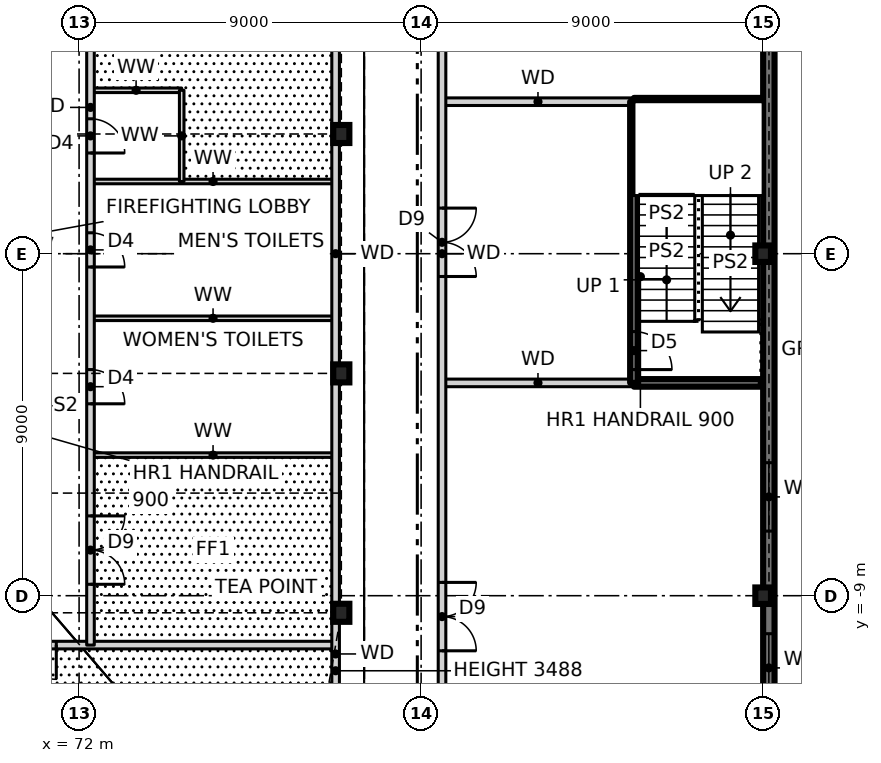
"""IFC4 building model, lengths in metres.
Left out: names, types, materials, properties, quantities, classifications, styles, units other than length and angle.
Written with IfcOpenShell. Run it as: python <this file> out.ifc"""

import sys

from ifc_helpers import new_model, si_unit, direction, frame, frame_2d, origin, origin_2d, place, context, subcontext, project, spatial, rectangle, i_section, extrude, element, fill, save


model = new_model("IFC4")
c1 = context("Model", 3, precision=1e-05, world=origin(), true_north=direction((0.0, 1.0)))
c2 = subcontext(c1, "Body", "Model", "MODEL_VIEW")
j1 = project(units=[si_unit("LENGTHUNIT", "METRE"), si_unit("PLANEANGLEUNIT", "RADIAN")], contexts=[c1])
p1 = place(None, origin())
s1 = spatial("IfcSite", under=j1, at=p1, CompositionType="ELEMENT")
p2 = place(p1, origin())
s2 = spatial("IfcBuilding", under=s1, at=p2, CompositionType="ELEMENT")
p3 = place(p2, frame((0.0, 0.0, 6.0)))
s3 = spatial("IfcBuildingStorey", under=s2, at=p3, CompositionType="ELEMENT", Elevation=6.0)
for number, where, z_axis, x_axis in (
    (1, (78.9, -9.45, 0.0), (0.0, 0.0, 1.0), (1.0, 0.0, 0.0)),
    (2, (78.9, -3.15, 0.0), (0.0, 0.0, 1.0), (1.0, 0.0, 0.0)),
    (3, (78.9, 3.15, 0.0), (0.0, 0.0, 1.0), (1.0, 0.0, 0.0)),
):
    element("IfcColumn", number, at=place(p3, frame(where, z_axis=z_axis, x_axis=x_axis)), inside=s3, PredefinedType="COLUMN", context=c2, shape_type="SweptSolid", body=[
        extrude(i_section(OverallWidth=0.424, OverallDepth=0.475, WebThickness=0.048, FlangeThickness=0.077, at=origin_2d()), origin(), (0.0, 0.0, 1.0), 4.5),
    ])
for number, where, z_axis, x_axis in (
    (4, (90.0, -9.0, 0.0), (0.0, 0.0, 1.0), (1.0, 0.0, 0.0)),
    (5, (90.0, 0.0, 0.0), (0.0, 0.0, 1.0), (1.0, 0.0, 0.0)),
):
    element("IfcColumn", number, at=place(p3, frame(where, z_axis=z_axis, x_axis=x_axis)), inside=s3, PredefinedType="COLUMN", context=c2, shape_type="SweptSolid", body=[
        extrude(i_section(OverallWidth=0.411, OverallDepth=0.434, WebThickness=0.036, FlangeThickness=0.057, at=origin_2d()), origin(), (0.0, 0.0, 1.0), 4.5),
    ])
p4 = place(p3, frame((90.15, -36.3, -0.25), z_axis=(0.0, 0.0, 1.0), x_axis=(0.0, 1.0, 0.0)))
e6 = element("IfcWall", 6, at=p4, inside=s3, PredefinedType="SOLIDWALL", context=c2, shape_type="SweptSolid", body=[
    extrude(rectangle(XDim=72.6, YDim=0.3, at=frame_2d((36.3, 0.0))), origin(), (0.0, 0.0, 1.0), 3.73),
])
p5 = place(p4, frame((2.0, 0.0, 1.15)))
e7 = element("IfcOpeningElement", 7, at=p5, cuts=e6, PredefinedType="OPENING", context=c2, shape_type="SweptSolid", body=[
    extrude(rectangle(XDim=1.8, YDim=2.4, at=frame_2d((0.9, 1.2))), frame((0.0, 0.16, 0.0), z_axis=(0.0, -1.0, 0.0), x_axis=(1.0, 0.0, 0.0)), (0.0, 0.0, 1.0), 0.32),
])
p6 = place(p4, frame((6.5, 0.0, 1.15)))
e8 = element("IfcOpeningElement", 8, at=p6, cuts=e6, PredefinedType="OPENING", context=c2, shape_type="SweptSolid", body=[
    extrude(rectangle(XDim=1.8, YDim=2.4, at=frame_2d((0.9, 1.2))), frame((0.0, 0.16, 0.0), z_axis=(0.0, -1.0, 0.0), x_axis=(1.0, 0.0, 0.0)), (0.0, 0.0, 1.0), 0.32),
])
p7 = place(p4, frame((11.0, 0.0, 1.15)))
e9 = element("IfcOpeningElement", 9, at=p7, cuts=e6, PredefinedType="OPENING", context=c2, shape_type="SweptSolid", body=[
    extrude(rectangle(XDim=1.8, YDim=2.4, at=frame_2d((0.9, 1.2))), frame((0.0, 0.16, 0.0), z_axis=(0.0, -1.0, 0.0), x_axis=(1.0, 0.0, 0.0)), (0.0, 0.0, 1.0), 0.32),
])
p8 = place(p4, frame((15.5, 0.0, 1.15)))
e10 = element("IfcOpeningElement", 10, at=p8, cuts=e6, PredefinedType="OPENING", context=c2, shape_type="SweptSolid", body=[
    extrude(rectangle(XDim=1.8, YDim=2.4, at=frame_2d((0.9, 1.2))), frame((0.0, 0.16, 0.0), z_axis=(0.0, -1.0, 0.0), x_axis=(1.0, 0.0, 0.0)), (0.0, 0.0, 1.0), 0.32),
])
p9 = place(p4, frame((20.0, 0.0, 1.15)))
e11 = element("IfcOpeningElement", 11, at=p9, cuts=e6, PredefinedType="OPENING", context=c2, shape_type="SweptSolid", body=[
    extrude(rectangle(XDim=1.8, YDim=2.4, at=frame_2d((0.9, 1.2))), frame((0.0, 0.16, 0.0), z_axis=(0.0, -1.0, 0.0), x_axis=(1.0, 0.0, 0.0)), (0.0, 0.0, 1.0), 0.32),
])
p10 = place(p4, frame((24.5, 0.0, 1.15)))
e12 = element("IfcOpeningElement", 12, at=p10, cuts=e6, PredefinedType="OPENING", context=c2, shape_type="SweptSolid", body=[
    extrude(rectangle(XDim=1.8, YDim=2.4, at=frame_2d((0.9, 1.2))), frame((0.0, 0.16, 0.0), z_axis=(0.0, -1.0, 0.0), x_axis=(1.0, 0.0, 0.0)), (0.0, 0.0, 1.0), 0.32),
])
p11 = place(p4, frame((29.0, 0.0, 1.15)))
e13 = element("IfcOpeningElement", 13, at=p11, cuts=e6, PredefinedType="OPENING", context=c2, shape_type="SweptSolid", body=[
    extrude(rectangle(XDim=1.8, YDim=2.4, at=frame_2d((0.9, 1.2))), frame((0.0, 0.16, 0.0), z_axis=(0.0, -1.0, 0.0), x_axis=(1.0, 0.0, 0.0)), (0.0, 0.0, 1.0), 0.32),
])
p12 = place(p4, frame((42.5, 0.0, 1.15)))
e14 = element("IfcOpeningElement", 14, at=p12, cuts=e6, PredefinedType="OPENING", context=c2, shape_type="SweptSolid", body=[
    extrude(rectangle(XDim=1.8, YDim=2.4, at=frame_2d((0.9, 1.2))), frame((0.0, 0.16, 0.0), z_axis=(0.0, -1.0, 0.0), x_axis=(1.0, 0.0, 0.0)), (0.0, 0.0, 1.0), 0.32),
])
p13 = place(p4, frame((47.0, 0.0, 1.15)))
e15 = element("IfcOpeningElement", 15, at=p13, cuts=e6, PredefinedType="OPENING", context=c2, shape_type="SweptSolid", body=[
    extrude(rectangle(XDim=1.8, YDim=2.4, at=frame_2d((0.9, 1.2))), frame((0.0, 0.16, 0.0), z_axis=(0.0, -1.0, 0.0), x_axis=(1.0, 0.0, 0.0)), (0.0, 0.0, 1.0), 0.32),
])
p14 = place(p4, frame((51.5, 0.0, 1.15)))
e16 = element("IfcOpeningElement", 16, at=p14, cuts=e6, PredefinedType="OPENING", context=c2, shape_type="SweptSolid", body=[
    extrude(rectangle(XDim=1.8, YDim=2.4, at=frame_2d((0.9, 1.2))), frame((0.0, 0.16, 0.0), z_axis=(0.0, -1.0, 0.0), x_axis=(1.0, 0.0, 0.0)), (0.0, 0.0, 1.0), 0.32),
])
p15 = place(p4, frame((56.0, 0.0, 1.15)))
e17 = element("IfcOpeningElement", 17, at=p15, cuts=e6, PredefinedType="OPENING", context=c2, shape_type="SweptSolid", body=[
    extrude(rectangle(XDim=1.8, YDim=2.4, at=frame_2d((0.9, 1.2))), frame((0.0, 0.16, 0.0), z_axis=(0.0, -1.0, 0.0), x_axis=(1.0, 0.0, 0.0)), (0.0, 0.0, 1.0), 0.32),
])
p16 = place(p4, frame((60.5, 0.0, 1.15)))
e18 = element("IfcOpeningElement", 18, at=p16, cuts=e6, PredefinedType="OPENING", context=c2, shape_type="SweptSolid", body=[
    extrude(rectangle(XDim=1.8, YDim=2.4, at=frame_2d((0.9, 1.2))), frame((0.0, 0.16, 0.0), z_axis=(0.0, -1.0, 0.0), x_axis=(1.0, 0.0, 0.0)), (0.0, 0.0, 1.0), 0.32),
])
p17 = place(p4, frame((65.0, 0.0, 1.15)))
e19 = element("IfcOpeningElement", 19, at=p17, cuts=e6, PredefinedType="OPENING", context=c2, shape_type="SweptSolid", body=[
    extrude(rectangle(XDim=1.8, YDim=2.4, at=frame_2d((0.9, 1.2))), frame((0.0, 0.16, 0.0), z_axis=(0.0, -1.0, 0.0), x_axis=(1.0, 0.0, 0.0)), (0.0, 0.0, 1.0), 0.32),
])
p18 = place(p4, frame((69.5, 0.0, 1.15)))
e20 = element("IfcOpeningElement", 20, at=p18, cuts=e6, PredefinedType="OPENING", context=c2, shape_type="SweptSolid", body=[
    extrude(rectangle(XDim=1.8, YDim=2.4, at=frame_2d((0.9, 1.2))), frame((0.0, 0.16, 0.0), z_axis=(0.0, -1.0, 0.0), x_axis=(1.0, 0.0, 0.0)), (0.0, 0.0, 1.0), 0.32),
])
p19 = place(p3, frame((53.7, -10.3, 0.0), z_axis=(0.0, 0.0, 1.0), x_axis=(1.0, 0.0, 0.0)))
e21 = element("IfcWall", 21, at=p19, inside=s3, PredefinedType="SOLIDWALL", context=c2, shape_type="SweptSolid", body=[
    extrude(rectangle(XDim=25.05, YDim=0.2, at=frame_2d((12.525, 0.0))), origin(), (0.0, 0.0, 1.0), 4.25),
])
p20 = place(p19, frame((6.6, 0.0, 0.0)))
e22 = element("IfcOpeningElement", 22, at=p20, cuts=e21, PredefinedType="OPENING", context=c2, shape_type="SweptSolid", body=[
    extrude(rectangle(XDim=1.8, YDim=2.1, at=frame_2d((0.9, 1.05))), frame((0.0, 0.11, 0.0), z_axis=(0.0, -1.0, 0.0), x_axis=(1.0, 0.0, 0.0)), (0.0, 0.0, 1.0), 0.22),
])
p21 = place(p19, frame((15.9, 0.0, 0.0)))
e23 = element("IfcOpeningElement", 23, at=p21, cuts=e21, PredefinedType="OPENING", context=c2, shape_type="SweptSolid", body=[
    extrude(rectangle(XDim=1.8, YDim=2.1, at=frame_2d((0.9, 1.05))), frame((0.0, 0.11, 0.0), z_axis=(0.0, -1.0, 0.0), x_axis=(1.0, 0.0, 0.0)), (0.0, 0.0, 1.0), 0.22),
])
p22 = place(p3, frame((72.3, -5.3, 0.0), z_axis=(0.0, 0.0, 1.0), x_axis=(1.0, 0.0, 0.0)))
e24 = element("IfcWall", 24, at=p22, inside=s3, PredefinedType="PARTITIONING", context=c2, shape_type="SweptSolid", body=[
    extrude(rectangle(XDim=6.45, YDim=0.12, at=frame_2d((3.225, 0.0))), origin(), (0.0, 0.0, 1.0), 4.25),
])
p23 = place(p3, frame((81.55, -3.4, 0.0), z_axis=(0.0, 0.0, 1.0), x_axis=(1.0, 0.0, 0.0)))
e25 = element("IfcWall", 25, at=p23, inside=s3, PredefinedType="SOLIDWALL", context=c2, shape_type="SweptSolid", body=[
    extrude(rectangle(XDim=5.05, YDim=0.2, at=frame_2d((2.525, 0.0))), origin(), (0.0, 0.0, 1.0), 4.25),
])
p24 = place(p3, frame((86.6, -3.4, 0.0), z_axis=(0.0, 0.0, 1.0), x_axis=(1.0, 0.0, 0.0)))
e26 = element("IfcWall", 26, at=p24, inside=s3, PredefinedType="SOLIDWALL", context=c2, shape_type="SweptSolid", body=[
    extrude(rectangle(XDim=3.34, YDim=0.2, at=frame_2d((1.67, 0.0))), origin(), (0.0, 0.0, 1.0), 4.5),
])
for number, where, z_axis, x_axis in (
    (27, (72.3, -1.7, 0.0), (0.0, 0.0, 1.0), (1.0, 0.0, 0.0)),
    (28, (72.3, 1.9, 0.0), (0.0, 0.0, 1.0), (1.0, 0.0, 0.0)),
):
    element("IfcWall", number, at=place(p3, frame(where, z_axis=z_axis, x_axis=x_axis)), inside=s3, PredefinedType="PARTITIONING", context=c2, shape_type="SweptSolid", body=[
        extrude(rectangle(XDim=6.45, YDim=0.12, at=frame_2d((3.225, 0.0))), origin(), (0.0, 0.0, 1.0), 4.25),
    ])
p25 = place(p3, frame((81.55, 4.0, 0.0), z_axis=(0.0, 0.0, 1.0), x_axis=(1.0, 0.0, 0.0)))
e29 = element("IfcWall", 29, at=p25, inside=s3, PredefinedType="SOLIDWALL", context=c2, shape_type="SweptSolid", body=[
    extrude(rectangle(XDim=5.05, YDim=0.2, at=frame_2d((2.525, 0.0))), origin(), (0.0, 0.0, 1.0), 4.25),
])
p26 = place(p3, frame((86.6, 4.0, 0.0), z_axis=(0.0, 0.0, 1.0), x_axis=(1.0, 0.0, 0.0)))
e30 = element("IfcWall", 30, at=p26, inside=s3, PredefinedType="SOLIDWALL", context=c2, shape_type="SweptSolid", body=[
    extrude(rectangle(XDim=3.34, YDim=0.2, at=frame_2d((1.67, 0.0))), origin(), (0.0, 0.0, 1.0), 4.5),
])
p27 = place(p3, frame((72.3, 4.3, 0.0), z_axis=(0.0, 0.0, 1.0), x_axis=(1.0, 0.0, 0.0)))
e31 = element("IfcWall", 31, at=p27, inside=s3, PredefinedType="PARTITIONING", context=c2, shape_type="SweptSolid", body=[
    extrude(rectangle(XDim=2.4, YDim=0.12, at=frame_2d((1.2, 0.0))), origin(), (0.0, 0.0, 1.0), 4.25),
])
p28 = place(p3, frame((86.6, -3.4, 0.0), z_axis=(0.0, 0.0, 1.0), x_axis=(0.0, 1.0, 0.0)))
e32 = element("IfcWall", 32, at=p28, inside=s3, PredefinedType="SOLIDWALL", context=c2, shape_type="SweptSolid", body=[
    extrude(rectangle(XDim=7.4, YDim=0.2, at=frame_2d((3.7, 0.0))), origin(), (0.0, 0.0, 1.0), 4.5),
])
p29 = place(p28, frame((0.35, 0.0, 0.0)))
e33 = element("IfcOpeningElement", 33, at=p29, cuts=e32, PredefinedType="OPENING", context=c2, shape_type="SweptSolid", body=[
    extrude(rectangle(XDim=1.0, YDim=2.1, at=frame_2d((0.5, 1.05))), frame((0.0, 0.11, 0.0), z_axis=(0.0, -1.0, 0.0), x_axis=(1.0, 0.0, 0.0)), (0.0, 0.0, 1.0), 0.22),
])
p30 = place(p3, frame((81.55, -36.05, 0.0), z_axis=(0.0, 0.0, 1.0), x_axis=(0.0, 1.0, 0.0)))
e34 = element("IfcWall", 34, at=p30, inside=s3, PredefinedType="SOLIDWALL", context=c2, shape_type="SweptSolid", body=[
    extrude(rectangle(XDim=72.1, YDim=0.2, at=frame_2d((36.05, 0.0))), origin(), (0.0, 0.0, 1.0), 4.25),
])
p31 = place(p30, frame((66.65, 0.0, 0.0)))
e35 = element("IfcOpeningElement", 35, at=p31, cuts=e34, PredefinedType="OPENING", context=c2, shape_type="SweptSolid", body=[
    extrude(rectangle(XDim=1.8, YDim=2.1, at=frame_2d((0.9, 1.05))), frame((0.0, 0.11, 0.0), z_axis=(0.0, -1.0, 0.0), x_axis=(1.0, 0.0, 0.0)), (0.0, 0.0, 1.0), 0.22),
])
p32 = place(p30, frame((25.6, 0.0, 0.0)))
e36 = element("IfcOpeningElement", 36, at=p32, cuts=e34, PredefinedType="OPENING", context=c2, shape_type="SweptSolid", body=[
    extrude(rectangle(XDim=1.8, YDim=2.1, at=frame_2d((0.9, 1.05))), frame((0.0, 0.11, 0.0), z_axis=(0.0, -1.0, 0.0), x_axis=(1.0, 0.0, 0.0)), (0.0, 0.0, 1.0), 0.22),
])
p33 = place(p30, frame((35.45, 0.0, 0.0)))
e37 = element("IfcOpeningElement", 37, at=p33, cuts=e34, PredefinedType="OPENING", context=c2, shape_type="SweptSolid", body=[
    extrude(rectangle(XDim=1.8, YDim=2.1, at=frame_2d((0.9, 1.05))), frame((0.0, 0.11, 0.0), z_axis=(0.0, -1.0, 0.0), x_axis=(1.0, 0.0, 0.0)), (0.0, 0.0, 1.0), 0.22),
])
p34 = place(p30, frame((50.15, 0.0, 0.0)))
e38 = element("IfcOpeningElement", 38, at=p34, cuts=e34, PredefinedType="OPENING", context=c2, shape_type="SweptSolid", body=[
    extrude(rectangle(XDim=1.8, YDim=2.1, at=frame_2d((0.9, 1.05))), frame((0.0, 0.11, 0.0), z_axis=(0.0, -1.0, 0.0), x_axis=(1.0, 0.0, 0.0)), (0.0, 0.0, 1.0), 0.22),
])
p35 = place(p3, frame((74.7, 1.9, 0.0), z_axis=(0.0, 0.0, 1.0), x_axis=(0.0, 1.0, 0.0)))
e39 = element("IfcWall", 39, at=p35, inside=s3, PredefinedType="PARTITIONING", context=c2, shape_type="SweptSolid", body=[
    extrude(rectangle(XDim=2.4, YDim=0.12, at=frame_2d((1.2, 0.0))), origin(), (0.0, 0.0, 1.0), 4.25),
])
p36 = place(p3, frame((72.3, -10.3, 0.0), z_axis=(0.0, 0.0, 1.0), x_axis=(0.0, 1.0, 0.0)))
e40 = element("IfcWall", 40, at=p36, inside=s3, PredefinedType="SOLIDWALL", context=c2, shape_type="SweptSolid", body=[
    extrude(rectangle(XDim=28.3, YDim=0.2, at=frame_2d((14.15, 0.0))), origin(), (0.0, 0.0, 1.0), 4.25),
])
p37 = place(p36, frame((1.6, 0.0, 0.0)))
e41 = element("IfcOpeningElement", 41, at=p37, cuts=e40, PredefinedType="OPENING", context=c2, shape_type="SweptSolid", body=[
    extrude(rectangle(XDim=1.8, YDim=2.1, at=frame_2d((0.9, 1.05))), frame((0.0, 0.11, 0.0), z_axis=(0.0, -1.0, 0.0), x_axis=(1.0, 0.0, 0.0)), (0.0, 0.0, 1.0), 0.22),
])
p38 = place(p36, frame((6.35, 0.0, 0.0)))
e42 = element("IfcOpeningElement", 42, at=p38, cuts=e40, PredefinedType="OPENING", context=c2, shape_type="SweptSolid", body=[
    extrude(rectangle(XDim=0.9, YDim=2.1, at=frame_2d((0.45, 1.05))), frame((0.0, 0.11, 0.0), z_axis=(0.0, -1.0, 0.0), x_axis=(1.0, 0.0, 0.0)), (0.0, 0.0, 1.0), 0.22),
])
p39 = place(p36, frame((9.95, 0.0, 0.0)))
e43 = element("IfcOpeningElement", 43, at=p39, cuts=e40, PredefinedType="OPENING", context=c2, shape_type="SweptSolid", body=[
    extrude(rectangle(XDim=0.9, YDim=2.1, at=frame_2d((0.45, 1.05))), frame((0.0, 0.11, 0.0), z_axis=(0.0, -1.0, 0.0), x_axis=(1.0, 0.0, 0.0)), (0.0, 0.0, 1.0), 0.22),
])
p40 = place(p36, frame((12.95, 0.0, 0.0)))
e44 = element("IfcOpeningElement", 44, at=p40, cuts=e40, PredefinedType="OPENING", context=c2, shape_type="SweptSolid", body=[
    extrude(rectangle(XDim=0.9, YDim=2.1, at=frame_2d((0.45, 1.05))), frame((0.0, 0.11, 0.0), z_axis=(0.0, -1.0, 0.0), x_axis=(1.0, 0.0, 0.0)), (0.0, 0.0, 1.0), 0.22),
])
p41 = place(p36, frame((16.7, 0.0, 0.0)))
e45 = element("IfcOpeningElement", 45, at=p41, cuts=e40, PredefinedType="OPENING", context=c2, shape_type="SweptSolid", body=[
    extrude(rectangle(XDim=1.8, YDim=2.1, at=frame_2d((0.9, 1.05))), frame((0.0, 0.11, 0.0), z_axis=(0.0, -1.0, 0.0), x_axis=(1.0, 0.0, 0.0)), (0.0, 0.0, 1.0), 0.22),
])
p42 = place(p3, frame((78.75, -11.639, 0.0), z_axis=(0.0, 0.0, 1.0), x_axis=(0.0, 1.0, 0.0)))
e46 = element("IfcWall", 46, at=p42, inside=s3, PredefinedType="SOLIDWALL", context=c2, shape_type="SweptSolid", body=[
    extrude(rectangle(XDim=2.212, YDim=0.2, at=frame_2d((1.106, 0.0))), origin(), (0.0, 0.0, 1.0), 3.488),
])
p43 = place(p3, frame((78.75, -9.427, 0.0), z_axis=(0.0, 0.0, 1.0), x_axis=(0.0, 1.0, 0.0)))
e47 = element("IfcWall", 47, at=p43, inside=s3, PredefinedType="SOLIDWALL", context=c2, shape_type="SweptSolid", body=[
    extrude(rectangle(XDim=18.854, YDim=0.2, at=frame_2d((9.427, 0.0))), origin(), (0.0, 0.0, 1.0), 4.25),
])
p44 = place(p10, origin())
e48 = element("IfcWindow", 48, at=p44, inside=s3, PartitioningType="SINGLE_PANEL", PredefinedType="WINDOW", context=c2, shape_type="SweptSolid", body=[
    extrude(rectangle(XDim=1.8, YDim=2.4, at=frame_2d((0.9, 1.2))), frame((0.0, 0.03, 0.0), z_axis=(0.0, -1.0, 0.0), x_axis=(1.0, 0.0, 0.0)), (0.0, 0.0, 1.0), 0.06),
])
fill(e12, e48)
p45 = place(p11, origin())
e49 = element("IfcWindow", 49, at=p45, inside=s3, PartitioningType="SINGLE_PANEL", PredefinedType="WINDOW", context=c2, shape_type="SweptSolid", body=[
    extrude(rectangle(XDim=1.8, YDim=2.4, at=frame_2d((0.9, 1.2))), frame((0.0, 0.03, 0.0), z_axis=(0.0, -1.0, 0.0), x_axis=(1.0, 0.0, 0.0)), (0.0, 0.0, 1.0), 0.06),
])
fill(e13, e49)
p46 = place(p21, frame((1.8, 0.0, 0.0), z_axis=(0.0, 0.0, 1.0), x_axis=(-1.0, 0.0, 0.0)))
e50 = element("IfcDoor", 50, at=p46, inside=s3, OperationType="DOUBLE_DOOR_SINGLE_SWING", PredefinedType="DOOR", context=c2, shape_type="SweptSolid", body=[
    extrude(rectangle(XDim=1.8, YDim=2.1, at=frame_2d((0.9, 1.05))), frame((0.0, 0.025, 0.0), z_axis=(0.0, -1.0, 0.0), x_axis=(1.0, 0.0, 0.0)), (0.0, 0.0, 1.0), 0.05),
])
fill(e23, e50)
p47 = place(p37, frame((1.8, 0.0, 0.0), z_axis=(0.0, 0.0, 1.0), x_axis=(-1.0, 0.0, 0.0)))
e51 = element("IfcDoor", 51, at=p47, inside=s3, OperationType="DOUBLE_DOOR_SINGLE_SWING", PredefinedType="DOOR", context=c2, shape_type="SweptSolid", body=[
    extrude(rectangle(XDim=1.8, YDim=2.1, at=frame_2d((0.9, 1.05))), frame((0.0, 0.025, 0.0), z_axis=(0.0, -1.0, 0.0), x_axis=(1.0, 0.0, 0.0)), (0.0, 0.0, 1.0), 0.05),
])
fill(e41, e51)
p48 = place(p38, frame((0.9, 0.0, 0.0), z_axis=(0.0, 0.0, 1.0), x_axis=(-1.0, 0.0, 0.0)))
e52 = element("IfcDoor", 52, at=p48, inside=s3, OperationType="SINGLE_SWING_RIGHT", PredefinedType="DOOR", context=c2, shape_type="SweptSolid", body=[
    extrude(rectangle(XDim=0.9, YDim=2.1, at=frame_2d((0.45, 1.05))), frame((0.0, 0.025, 0.0), z_axis=(0.0, -1.0, 0.0), x_axis=(1.0, 0.0, 0.0)), (0.0, 0.0, 1.0), 0.05),
])
fill(e42, e52)
p49 = place(p39, frame((0.9, 0.0, 0.0), z_axis=(0.0, 0.0, 1.0), x_axis=(-1.0, 0.0, 0.0)))
e53 = element("IfcDoor", 53, at=p49, inside=s3, OperationType="SINGLE_SWING_RIGHT", PredefinedType="DOOR", context=c2, shape_type="SweptSolid", body=[
    extrude(rectangle(XDim=0.9, YDim=2.1, at=frame_2d((0.45, 1.05))), frame((0.0, 0.025, 0.0), z_axis=(0.0, -1.0, 0.0), x_axis=(1.0, 0.0, 0.0)), (0.0, 0.0, 1.0), 0.05),
])
fill(e43, e53)
p50 = place(p40, frame((0.9, 0.0, 0.0), z_axis=(0.0, 0.0, 1.0), x_axis=(-1.0, 0.0, 0.0)))
e54 = element("IfcDoor", 54, at=p50, inside=s3, OperationType="SINGLE_SWING_RIGHT", PredefinedType="DOOR", context=c2, shape_type="SweptSolid", body=[
    extrude(rectangle(XDim=0.9, YDim=2.1, at=frame_2d((0.45, 1.05))), frame((0.0, 0.025, 0.0), z_axis=(0.0, -1.0, 0.0), x_axis=(1.0, 0.0, 0.0)), (0.0, 0.0, 1.0), 0.05),
])
fill(e44, e54)
p51 = place(p32, frame((1.8, 0.0, 0.0), z_axis=(0.0, 0.0, 1.0), x_axis=(-1.0, 0.0, 0.0)))
e55 = element("IfcDoor", 55, at=p51, inside=s3, OperationType="DOUBLE_DOOR_SINGLE_SWING", PredefinedType="DOOR", context=c2, shape_type="SweptSolid", body=[
    extrude(rectangle(XDim=1.8, YDim=2.1, at=frame_2d((0.9, 1.05))), frame((0.0, 0.025, 0.0), z_axis=(0.0, -1.0, 0.0), x_axis=(1.0, 0.0, 0.0)), (0.0, 0.0, 1.0), 0.05),
])
fill(e36, e55)
p52 = place(p33, frame((1.8, 0.0, 0.0), z_axis=(0.0, 0.0, 1.0), x_axis=(-1.0, 0.0, 0.0)))
e56 = element("IfcDoor", 56, at=p52, inside=s3, OperationType="DOUBLE_DOOR_SINGLE_SWING", PredefinedType="DOOR", context=c2, shape_type="SweptSolid", body=[
    extrude(rectangle(XDim=1.8, YDim=2.1, at=frame_2d((0.9, 1.05))), frame((0.0, 0.025, 0.0), z_axis=(0.0, -1.0, 0.0), x_axis=(1.0, 0.0, 0.0)), (0.0, 0.0, 1.0), 0.05),
])
fill(e37, e56)
p53 = place(p29, frame((1.0, 0.0, 0.0), z_axis=(0.0, 0.0, 1.0), x_axis=(-1.0, 0.0, 0.0)))
e57 = element("IfcDoor", 57, at=p53, inside=s3, OperationType="SINGLE_SWING_RIGHT", PredefinedType="DOOR", context=c2, shape_type="SweptSolid", body=[
    extrude(rectangle(XDim=1.0, YDim=2.1, at=frame_2d((0.5, 1.05))), frame((0.0, 0.025, 0.0), z_axis=(0.0, -1.0, 0.0), x_axis=(1.0, 0.0, 0.0)), (0.0, 0.0, 1.0), 0.05),
])
fill(e33, e57)
save(model, sys.argv[1])
